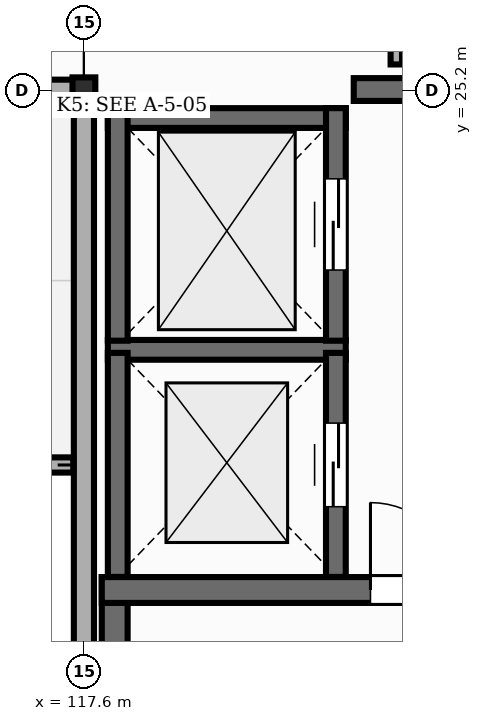
"""IFC4 building model, lengths in metres.
Left out: names, types, materials, properties, quantities, classifications, styles, units other than length and angle.
Written with IfcOpenShell. Run it as: python <this file> out.ifc"""

import sys

from ifc_helpers import new_model, si_unit, direction, frame, frame_2d, origin, origin_2d, place, context, subcontext, project, spatial, rectangle, i_section, extrude, element, fill, save


model = new_model("IFC4")
c1 = context("Model", 3, precision=1e-05, world=origin(), true_north=direction((0.0, 1.0)))
c2 = subcontext(c1, "Body", "Model", "MODEL_VIEW")
j1 = project(units=[si_unit("LENGTHUNIT", "METRE"), si_unit("PLANEANGLEUNIT", "RADIAN")], contexts=[c1])
p1 = place(None, origin())
s1 = spatial("IfcSite", under=j1, at=p1, CompositionType="ELEMENT")
p2 = place(p1, origin())
s2 = spatial("IfcBuilding", under=s1, at=p2, CompositionType="ELEMENT")
p3 = place(p2, frame((0.0, 0.0, 9.9)))
s3 = spatial("IfcBuildingStorey", under=s2, at=p3, CompositionType="ELEMENT", Elevation=9.9)
p4 = place(p3, frame((117.6, 25.2, 0.0), z_axis=(0.0, 0.0, 1.0), x_axis=(1.0, 0.0, 0.0)))
e1 = element("IfcColumn", 1, at=p4, inside=s3, PredefinedType="COLUMN", context=c2, shape_type="SweptSolid", body=[
    extrude(i_section(OverallWidth=0.3, OverallDepth=0.34, WebThickness=0.012, FlangeThickness=0.021, FilletRadius=0.027, at=origin_2d()), origin(), (0.0, 0.0, 1.0), 4.05),
])
p5 = place(p3, frame((109.208, 25.2, 0.0), z_axis=(0.0, 0.0, 1.0), x_axis=(1.0, 0.0, 0.0)))
e2 = element("IfcWall", 2, at=p5, inside=s3, PredefinedType="STANDARD", context=c2, shape_type="SweptSolid", body=[
    extrude(rectangle(XDim=8.384, YDim=0.28, at=frame_2d((4.192, 0.0))), origin(), (0.0, 0.0, 1.0), 3.472),
])
p6 = place(p3, frame((117.6, 25.034, 0.0), z_axis=(0.0, 0.0, 1.0), x_axis=(0.0, -1.0, 0.0)))
e3 = element("IfcWall", 3, at=p6, inside=s3, PredefinedType="STANDARD", context=c2, shape_type="SweptSolid", body=[
    extrude(rectangle(XDim=8.058, YDim=0.265, at=frame_2d((4.029, 0.0))), origin(), (0.0, 0.0, 1.0), 3.472),
])
p7 = place(p3, frame((92.26, 20.27, 0.0), z_axis=(0.0, 0.0, 1.0), x_axis=(1.0, 0.0, 0.0)))
e4 = element("IfcWall", 4, at=p7, inside=s3, PredefinedType="PARAPET", context=c2, shape_type="SweptSolid", body=[
    extrude(rectangle(XDim=25.2, YDim=0.2, at=frame_2d((12.6, 0.0))), origin(), (0.0, 0.0, 1.0), 0.22),
])
p8 = place(p3, frame((118.005, 8.805, 0.0), z_axis=(0.0, 0.0, 1.0), x_axis=(0.0, 1.0, 0.0)))
e5 = element("IfcWall", 5, at=p8, inside=s3, PredefinedType="SHEAR", context=c2, shape_type="SweptSolid", body=[
    extrude(rectangle(XDim=9.99, YDim=0.34, at=frame_2d((4.995, 0.0))), origin(), (0.0, 0.0, 1.0), 3.84),
])
p9 = place(p3, frame((117.835, 18.625, 0.0), z_axis=(0.0, 0.0, 1.0), x_axis=(1.0, 0.0, 0.0)))
e6 = element("IfcWall", 6, at=p9, inside=s3, PredefinedType="SHEAR", context=c2, shape_type="SweptSolid", body=[
    extrude(rectangle(XDim=5.25, YDim=0.34, at=frame_2d((2.625, 0.0))), origin(), (0.0, 0.0, 1.0), 3.84),
])
p10 = place(p9, frame((3.535, 0.0, 0.0)))
e7 = element("IfcOpeningElement", 7, at=p10, cuts=e6, PredefinedType="OPENING", context=c2, shape_type="SweptSolid", body=[
    extrude(rectangle(XDim=1.15, YDim=2.15, at=frame_2d((0.575, 1.075))), frame((0.0, 0.18, 0.0), z_axis=(0.0, -1.0, 0.0), x_axis=(1.0, 0.0, 0.0)), (0.0, 0.0, 1.0), 0.36),
])
p11 = place(p3, frame((117.915, 21.785, 0.0), z_axis=(0.0, 0.0, 1.0), x_axis=(1.0, 0.0, 0.0)))
e8 = element("IfcWall", 8, at=p11, inside=s3, PredefinedType="SHEAR", context=c2, shape_type="SweptSolid", body=[
    extrude(rectangle(XDim=3.13, YDim=0.26, at=frame_2d((1.565, 0.0))), origin(), (0.0, 0.0, 1.0), 3.84),
])
p12 = place(p3, frame((118.045, 18.797, 0.0), z_axis=(0.0, 0.0, 1.0), x_axis=(0.0, 1.0, 0.0)))
e9 = element("IfcWall", 9, at=p12, inside=s3, PredefinedType="SHEAR", context=c2, shape_type="SweptSolid", body=[
    extrude(rectangle(XDim=2.948, YDim=0.26, at=frame_2d((1.474, 0.0))), origin(), (0.0, 0.0, 1.0), 3.84),
])
p13 = place(p3, frame((120.915, 18.797, 0.0), z_axis=(0.0, 0.0, 1.0), x_axis=(0.0, 1.0, 0.0)))
e10 = element("IfcWall", 10, at=p13, inside=s3, PredefinedType="SHEAR", context=c2, shape_type="SweptSolid", body=[
    extrude(rectangle(XDim=2.948, YDim=0.26, at=frame_2d((1.474, 0.0))), origin(), (0.0, 0.0, 1.0), 3.84),
])
p14 = place(p13, frame((0.924, 0.0, 0.0)))
e11 = element("IfcOpeningElement", 11, at=p14, cuts=e10, PredefinedType="OPENING", context=c2, shape_type="SweptSolid", body=[
    extrude(rectangle(XDim=1.1, YDim=2.15, at=frame_2d((0.55, 1.075))), frame((0.0, 0.14, 0.0), z_axis=(0.0, -1.0, 0.0), x_axis=(1.0, 0.0, 0.0)), (0.0, 0.0, 1.0), 0.28),
])
p15 = place(p3, frame((117.915, 24.835, 0.0), z_axis=(0.0, 0.0, 1.0), x_axis=(1.0, 0.0, 0.0)))
e12 = element("IfcWall", 12, at=p15, inside=s3, PredefinedType="SHEAR", context=c2, shape_type="SweptSolid", body=[
    extrude(rectangle(XDim=3.13, YDim=0.26, at=frame_2d((1.565, 0.0))), origin(), (0.0, 0.0, 1.0), 3.84),
])
p16 = place(p3, frame((118.045, 21.905, 0.0), z_axis=(0.0, 0.0, 1.0), x_axis=(0.0, 1.0, 0.0)))
e13 = element("IfcWall", 13, at=p16, inside=s3, PredefinedType="SHEAR", context=c2, shape_type="SweptSolid", body=[
    extrude(rectangle(XDim=3.06, YDim=0.26, at=frame_2d((1.53, 0.0))), origin(), (0.0, 0.0, 1.0), 3.84),
])
p17 = place(p3, frame((120.915, 21.905, 0.0), z_axis=(0.0, 0.0, 1.0), x_axis=(0.0, 1.0, 0.0)))
e14 = element("IfcWall", 14, at=p17, inside=s3, PredefinedType="SHEAR", context=c2, shape_type="SweptSolid", body=[
    extrude(rectangle(XDim=3.06, YDim=0.26, at=frame_2d((1.53, 0.0))), origin(), (0.0, 0.0, 1.0), 3.84),
])
p18 = place(p17, frame((0.93, 0.0, 0.0)))
e15 = element("IfcOpeningElement", 15, at=p18, cuts=e14, PredefinedType="OPENING", context=c2, shape_type="SweptSolid", body=[
    extrude(rectangle(XDim=1.2, YDim=2.15, at=frame_2d((0.6, 1.075))), frame((0.0, 0.14, 0.0), z_axis=(0.0, -1.0, 0.0), x_axis=(1.0, 0.0, 0.0)), (0.0, 0.0, 1.0), 0.28),
])
p19 = place(p3, frame((121.15, 25.21, 0.0), z_axis=(0.0, 0.0, 1.0), x_axis=(1.0, 0.0, 0.0)))
e16 = element("IfcWall", 16, at=p19, inside=s3, PredefinedType="SHEAR", context=c2, shape_type="SweptSolid", body=[
    extrude(rectangle(XDim=4.87, YDim=0.3, at=frame_2d((2.435, 0.0))), origin(), (0.0, 0.0, 1.0), 3.84),
])
p20 = place(p3, frame((121.71, 29.14, -0.004), z_axis=(0.0, 0.0, 1.0), x_axis=(0.0, -1.0, 0.0)))
e17 = element("IfcWall", 17, at=p20, inside=s3, PredefinedType="STANDARD", context=c2, shape_type="SweptSolid", body=[
    extrude(rectangle(XDim=3.6, YDim=0.15, at=frame_2d((1.8, 0.0))), origin(), (0.0, 0.0, 1.0), 3.844),
])
p21 = place(p10, origin())
e18 = element("IfcDoor", 18, at=p21, inside=s3, OperationType="SINGLE_SWING_LEFT", PredefinedType="DOOR", context=c2, shape_type="SweptSolid", body=[
    extrude(rectangle(XDim=1.15, YDim=2.15, at=frame_2d((0.575, 1.075))), frame((0.0, 0.025, 0.0), z_axis=(0.0, -1.0, 0.0), x_axis=(1.0, 0.0, 0.0)), (0.0, 0.0, 1.0), 0.05),
])
fill(e7, e18)
p22 = place(p14, origin())
e19 = element("IfcDoor", 19, at=p22, inside=s3, OperationType="DOUBLE_DOOR_SLIDING", PredefinedType="DOOR", context=c2, shape_type="SweptSolid", body=[
    extrude(rectangle(XDim=1.1, YDim=2.15, at=frame_2d((0.55, 1.075))), frame((0.0, 0.025, 0.0), z_axis=(0.0, -1.0, 0.0), x_axis=(1.0, 0.0, 0.0)), (0.0, 0.0, 1.0), 0.05),
])
fill(e11, e19)
p23 = place(p18, origin())
e20 = element("IfcDoor", 20, at=p23, inside=s3, OperationType="DOUBLE_DOOR_SLIDING", PredefinedType="DOOR", context=c2, shape_type="SweptSolid", body=[
    extrude(rectangle(XDim=1.2, YDim=2.15, at=frame_2d((0.6, 1.075))), frame((0.0, 0.025, 0.0), z_axis=(0.0, -1.0, 0.0), x_axis=(1.0, 0.0, 0.0)), (0.0, 0.0, 1.0), 0.05),
])
fill(e15, e20)
save(model, sys.argv[1])
